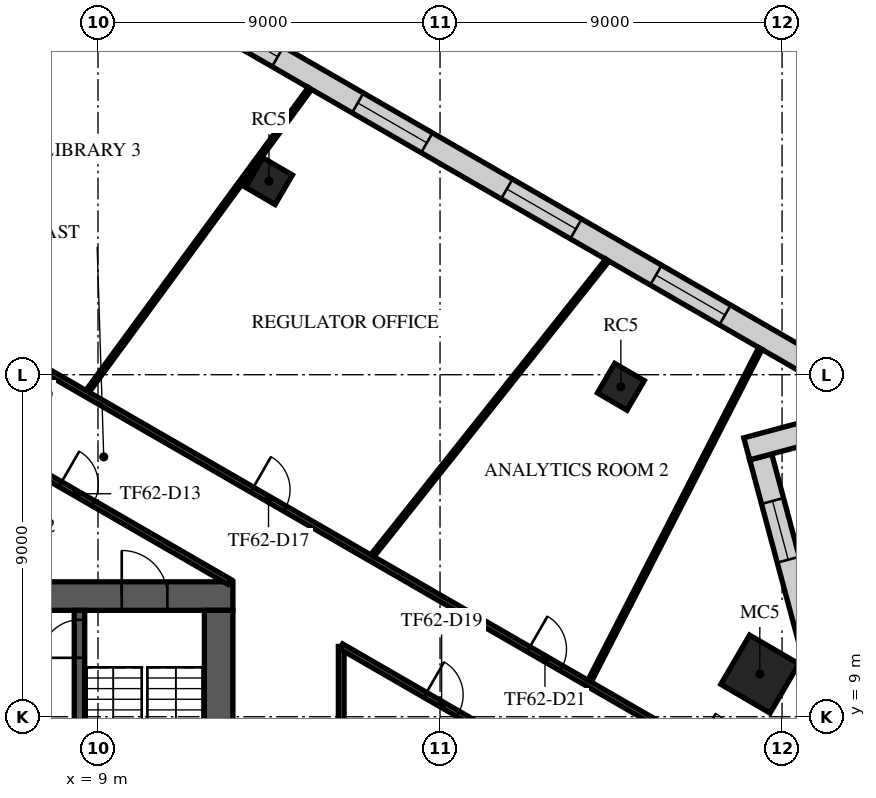
"""IFC4 building model, lengths in metres.
Left out: names, types, materials, properties, quantities, classifications, styles, units other than length and angle.
Written with IfcOpenShell. Run it as: python <this file> out.ifc"""

import sys

from ifc_helpers import new_model, si_unit, direction, frame, frame_2d, origin, origin_2d, place, context, subcontext, project, spatial, rectangle, extrude, element, fill, save


model = new_model("IFC4")
c1 = context("Model", 3, precision=1e-05, world=origin(), true_north=direction((0.0, 1.0)))
c2 = subcontext(c1, "Body", "Model", "MODEL_VIEW")
j1 = project(units=[si_unit("LENGTHUNIT", "METRE"), si_unit("PLANEANGLEUNIT", "RADIAN")], contexts=[c1])
p1 = place(None, origin())
s1 = spatial("IfcSite", under=j1, at=p1, CompositionType="ELEMENT")
p2 = place(p1, origin())
s2 = spatial("IfcBuilding", under=s1, at=p2, CompositionType="ELEMENT")
p3 = place(p2, frame((0.0, 0.0, 262.9)))
s3 = spatial("IfcBuildingStorey", under=s2, at=p3, CompositionType="ELEMENT", Elevation=262.9)
p4 = place(p3, frame((26.415, 10.122, 0.0), z_axis=(0.0, 0.0, 1.0), x_axis=(0.504643651291, 0.863327739165, 0.0)))
e1 = element("IfcColumn", 1, at=p4, inside=s3, PredefinedType="COLUMN", context=c2, shape_type="SweptSolid", body=[
    extrude(rectangle(XDim=1.5, YDim=1.5, at=origin_2d()), origin(), (0.0, 0.0, 1.0), 4.0),
])
for number, where, z_axis, x_axis in (
    (2, (22.758, 17.682, 0.0), (0.0, 0.0, 1.0), (0.505, 0.863, 0.0)),
    (3, (13.499, 23.094, 0.0), (0.0, 0.0, 1.0), (0.505, 0.863, 0.0)),
):
    element("IfcColumn", number, at=place(p3, frame(where, z_axis=z_axis, x_axis=x_axis)), inside=s3, PredefinedType="COLUMN", context=c2, shape_type="SweptSolid", body=[
        extrude(rectangle(XDim=0.9, YDim=0.9, at=origin_2d()), origin(), (0.0, 0.0, 1.0), 4.0),
    ])
p5 = place(p3, frame((-12.55, 12.175, 0.0), z_axis=(0.0, 0.0, 1.0), x_axis=(1.0, 0.0, 0.0)))
e4 = element("IfcWall", 4, at=p5, inside=s3, PredefinedType="SHEAR", context=c2, shape_type="SweptSolid", body=[
    extrude(rectangle(XDim=25.1, YDim=0.75, at=frame_2d((12.55, 0.0))), origin(), (0.0, 0.0, 1.0), 3.64),
])
p6 = place(p5, frame((11.35, 0.0, 0.0)))
e5 = element("IfcOpeningElement", 5, at=p6, cuts=e4, PredefinedType="OPENING", context=c2, shape_type="SweptSolid", body=[
    extrude(rectangle(XDim=2.4, YDim=2.4, at=frame_2d((1.2, 1.2))), frame((0.0, 0.385, 0.0), z_axis=(0.0, -1.0, 0.0), x_axis=(1.0, 0.0, 0.0)), (0.0, 0.0, 1.0), 0.77),
])
p7 = place(p5, frame((22.175, 0.0, 0.0)))
e6 = element("IfcOpeningElement", 6, at=p7, cuts=e4, PredefinedType="OPENING", context=c2, shape_type="SweptSolid", body=[
    extrude(rectangle(XDim=1.2, YDim=2.1, at=frame_2d((0.6, 1.05))), frame((0.0, 0.385, 0.0), z_axis=(0.0, -1.0, 0.0), x_axis=(1.0, 0.0, 0.0)), (0.0, 0.0, 1.0), 0.77),
])
p8 = place(p5, frame((1.15, 0.0, 0.0)))
e7 = element("IfcOpeningElement", 7, at=p8, cuts=e4, PredefinedType="OPENING", context=c2, shape_type="SweptSolid", body=[
    extrude(rectangle(XDim=1.0, YDim=2.1, at=frame_2d((0.5, 1.05))), frame((0.0, 0.385, 0.0), z_axis=(0.0, -1.0, 0.0), x_axis=(1.0, 0.0, 0.0)), (0.0, 0.0, 1.0), 0.77),
])
p9 = place(p3, frame((12.175, -11.8, 0.0), z_axis=(0.0, 0.0, 1.0), x_axis=(0.0, 1.0, 0.0)))
e8 = element("IfcWall", 8, at=p9, inside=s3, PredefinedType="SHEAR", context=c2, shape_type="SweptSolid", body=[
    extrude(rectangle(XDim=23.6, YDim=0.75, at=frame_2d((11.8, 0.0))), origin(), (0.0, 0.0, 1.0), 3.64),
])
p10 = place(p9, frame((10.6, 0.0, 0.0)))
e9 = element("IfcOpeningElement", 9, at=p10, cuts=e8, PredefinedType="OPENING", context=c2, shape_type="SweptSolid", body=[
    extrude(rectangle(XDim=2.4, YDim=2.4, at=frame_2d((1.2, 1.2))), frame((0.0, 0.385, 0.0), z_axis=(0.0, -1.0, 0.0), x_axis=(1.0, 0.0, 0.0)), (0.0, 0.0, 1.0), 0.77),
])
p11 = place(p3, frame((8.512, 4.55, 0.0), z_axis=(0.0, 0.0, 1.0), x_axis=(0.0, 1.0, 0.0)))
e10 = element("IfcWall", 10, at=p11, inside=s3, PredefinedType="SOLIDWALL", context=c2, shape_type="SweptSolid", body=[
    extrude(rectangle(XDim=7.25, YDim=0.275, at=frame_2d((3.625, 0.0))), origin(), (0.0, 0.0, 1.0), 3.64),
])
p12 = place(p11, frame((6.0, 0.0, 0.0)))
e11 = element("IfcOpeningElement", 11, at=p12, cuts=e10, PredefinedType="OPENING", context=c2, shape_type="SweptSolid", body=[
    extrude(rectangle(XDim=1.0, YDim=2.1, at=frame_2d((0.5, 1.05))), frame((0.0, 0.147, 0.0), z_axis=(0.0, -1.0, 0.0), x_axis=(1.0, 0.0, 0.0)), (0.0, 0.0, 1.0), 0.295),
])
p13 = place(p3, frame((8.094, -32.782, 0.0), z_axis=(0.0, 0.0, 1.0), x_axis=(0.499997945818, 0.866026589763, 0.0)))
e12 = element("IfcWall", 12, at=p13, inside=s3, PredefinedType="STANDARD", context=c2, shape_type="SweptSolid", body=[
    extrude(rectangle(XDim=48.686, YDim=0.6, at=frame_2d((24.343, 0.0))), origin(), (0.0, 0.0, 1.0), 3.64),
])
p14 = place(p13, frame((1.213, 0.0, 0.9)))
e13 = element("IfcOpeningElement", 13, at=p14, cuts=e12, PredefinedType="OPENING", context=c2, shape_type="SweptSolid", body=[
    extrude(rectangle(XDim=2.0, YDim=2.1, at=frame_2d((1.0, 1.05))), frame((0.0, 0.31, 0.0), z_axis=(0.0, -1.0, 0.0), x_axis=(1.0, 0.0, 0.0)), (0.0, 0.0, 1.0), 0.62),
])
p15 = place(p13, frame((5.639, 0.0, 0.9)))
e14 = element("IfcOpeningElement", 14, at=p15, cuts=e12, PredefinedType="OPENING", context=c2, shape_type="SweptSolid", body=[
    extrude(rectangle(XDim=2.0, YDim=2.1, at=frame_2d((1.0, 1.05))), frame((0.0, 0.31, 0.0), z_axis=(0.0, -1.0, 0.0), x_axis=(1.0, 0.0, 0.0)), (0.0, 0.0, 1.0), 0.62),
])
p16 = place(p13, frame((10.065, 0.0, 0.9)))
e15 = element("IfcOpeningElement", 15, at=p16, cuts=e12, PredefinedType="OPENING", context=c2, shape_type="SweptSolid", body=[
    extrude(rectangle(XDim=2.0, YDim=2.1, at=frame_2d((1.0, 1.05))), frame((0.0, 0.31, 0.0), z_axis=(0.0, -1.0, 0.0), x_axis=(1.0, 0.0, 0.0)), (0.0, 0.0, 1.0), 0.62),
])
p17 = place(p13, frame((14.491, 0.0, 0.9)))
e16 = element("IfcOpeningElement", 16, at=p17, cuts=e12, PredefinedType="OPENING", context=c2, shape_type="SweptSolid", body=[
    extrude(rectangle(XDim=2.0, YDim=2.1, at=frame_2d((1.0, 1.05))), frame((0.0, 0.31, 0.0), z_axis=(0.0, -1.0, 0.0), x_axis=(1.0, 0.0, 0.0)), (0.0, 0.0, 1.0), 0.62),
])
p18 = place(p13, frame((18.917, 0.0, 0.9)))
e17 = element("IfcOpeningElement", 17, at=p18, cuts=e12, PredefinedType="OPENING", context=c2, shape_type="SweptSolid", body=[
    extrude(rectangle(XDim=2.0, YDim=2.1, at=frame_2d((1.0, 1.05))), frame((0.0, 0.31, 0.0), z_axis=(0.0, -1.0, 0.0), x_axis=(1.0, 0.0, 0.0)), (0.0, 0.0, 1.0), 0.62),
])
p19 = place(p13, frame((23.343, 0.0, 0.9)))
e18 = element("IfcOpeningElement", 18, at=p19, cuts=e12, PredefinedType="OPENING", context=c2, shape_type="SweptSolid", body=[
    extrude(rectangle(XDim=2.0, YDim=2.1, at=frame_2d((1.0, 1.05))), frame((0.0, 0.31, 0.0), z_axis=(0.0, -1.0, 0.0), x_axis=(1.0, 0.0, 0.0)), (0.0, 0.0, 1.0), 0.62),
])
p20 = place(p13, frame((27.769, 0.0, 0.9)))
e19 = element("IfcOpeningElement", 19, at=p20, cuts=e12, PredefinedType="OPENING", context=c2, shape_type="SweptSolid", body=[
    extrude(rectangle(XDim=2.0, YDim=2.1, at=frame_2d((1.0, 1.05))), frame((0.0, 0.31, 0.0), z_axis=(0.0, -1.0, 0.0), x_axis=(1.0, 0.0, 0.0)), (0.0, 0.0, 1.0), 0.62),
])
p21 = place(p13, frame((32.195, 0.0, 0.9)))
e20 = element("IfcOpeningElement", 20, at=p21, cuts=e12, PredefinedType="OPENING", context=c2, shape_type="SweptSolid", body=[
    extrude(rectangle(XDim=2.0, YDim=2.1, at=frame_2d((1.0, 1.05))), frame((0.0, 0.31, 0.0), z_axis=(0.0, -1.0, 0.0), x_axis=(1.0, 0.0, 0.0)), (0.0, 0.0, 1.0), 0.62),
])
p22 = place(p13, frame((36.621, 0.0, 0.9)))
e21 = element("IfcOpeningElement", 21, at=p22, cuts=e12, PredefinedType="OPENING", context=c2, shape_type="SweptSolid", body=[
    extrude(rectangle(XDim=2.0, YDim=2.1, at=frame_2d((1.0, 1.05))), frame((0.0, 0.31, 0.0), z_axis=(0.0, -1.0, 0.0), x_axis=(1.0, 0.0, 0.0)), (0.0, 0.0, 1.0), 0.62),
])
p23 = place(p13, frame((41.047, 0.0, 0.9)))
e22 = element("IfcOpeningElement", 22, at=p23, cuts=e12, PredefinedType="OPENING", context=c2, shape_type="SweptSolid", body=[
    extrude(rectangle(XDim=2.0, YDim=2.1, at=frame_2d((1.0, 1.05))), frame((0.0, 0.31, 0.0), z_axis=(0.0, -1.0, 0.0), x_axis=(1.0, 0.0, 0.0)), (0.0, 0.0, 1.0), 0.62),
])
p24 = place(p13, frame((45.473, 0.0, 0.9)))
e23 = element("IfcOpeningElement", 23, at=p24, cuts=e12, PredefinedType="OPENING", context=c2, shape_type="SweptSolid", body=[
    extrude(rectangle(XDim=2.0, YDim=2.1, at=frame_2d((1.0, 1.05))), frame((0.0, 0.31, 0.0), z_axis=(0.0, -1.0, 0.0), x_axis=(1.0, 0.0, 0.0)), (0.0, 0.0, 1.0), 0.62),
])
p25 = place(p3, frame((28.509, 8.11, 0.0), z_axis=(0.0, 0.0, 1.0), x_axis=(-0.258815405168, 0.965926801599, 0.0)))
e24 = element("IfcWall", 24, at=p25, inside=s3, PredefinedType="STANDARD", context=c2, shape_type="SweptSolid", body=[
    extrude(rectangle(XDim=8.0, YDim=0.6, at=frame_2d((4.0, 0.0))), origin(), (0.0, 0.0, 1.0), 3.64),
])
p26 = place(p25, frame((5.2, 0.0, 0.9)))
e25 = element("IfcOpeningElement", 25, at=p26, cuts=e24, PredefinedType="OPENING", context=c2, shape_type="SweptSolid", body=[
    extrude(rectangle(XDim=1.6, YDim=2.1, at=frame_2d((0.8, 1.05))), frame((0.0, 0.31, 0.0), z_axis=(0.0, -1.0, 0.0), x_axis=(1.0, 0.0, 0.0)), (0.0, 0.0, 1.0), 0.62),
])
p27 = place(p3, frame((26.071, 16.049, 0.0), z_axis=(0.0, 0.0, 1.0), x_axis=(0.965928304125, 0.258809797517, 0.0)))
e26 = element("IfcWall", 26, at=p27, inside=s3, PredefinedType="STANDARD", context=c2, shape_type="SweptSolid", body=[
    extrude(rectangle(XDim=4.635, YDim=0.6, at=frame_2d((2.318, 0.0))), origin(), (0.0, 0.0, 1.0), 3.64),
])
p28 = place(p27, frame((1.818, 0.0, 0.9)))
e27 = element("IfcOpeningElement", 27, at=p28, cuts=e26, PredefinedType="OPENING", context=c2, shape_type="SweptSolid", body=[
    extrude(rectangle(XDim=1.6, YDim=2.1, at=frame_2d((0.8, 1.05))), frame((0.0, 0.31, 0.0), z_axis=(0.0, -1.0, 0.0), x_axis=(1.0, 0.0, 0.0)), (0.0, 0.0, 1.0), 0.62),
])
p29 = place(p3, frame((30.476, 16.699, 0.0), z_axis=(0.0, 0.0, 1.0), x_axis=(-0.866025061514, 0.500000592829, 0.0)))
e28 = element("IfcWall", 28, at=p29, inside=s3, PredefinedType="STANDARD", context=c2, shape_type="SweptSolid", body=[
    extrude(rectangle(XDim=36.243, YDim=0.6, at=frame_2d((18.122, 0.0))), origin(), (0.0, 0.0, 1.0), 3.64),
])
p30 = place(p29, frame((1.215, 0.0, 0.9)))
e29 = element("IfcOpeningElement", 29, at=p30, cuts=e28, PredefinedType="OPENING", context=c2, shape_type="SweptSolid", body=[
    extrude(rectangle(XDim=2.1, YDim=2.1, at=frame_2d((1.05, 1.05))), frame((0.0, 0.31, 0.0), z_axis=(0.0, -1.0, 0.0), x_axis=(1.0, 0.0, 0.0)), (0.0, 0.0, 1.0), 0.62),
])
p31 = place(p29, frame((5.746, 0.0, 0.9)))
e30 = element("IfcOpeningElement", 30, at=p31, cuts=e28, PredefinedType="OPENING", context=c2, shape_type="SweptSolid", body=[
    extrude(rectangle(XDim=2.1, YDim=2.1, at=frame_2d((1.05, 1.05))), frame((0.0, 0.31, 0.0), z_axis=(0.0, -1.0, 0.0), x_axis=(1.0, 0.0, 0.0)), (0.0, 0.0, 1.0), 0.62),
])
p32 = place(p29, frame((10.276, 0.0, 0.9)))
e31 = element("IfcOpeningElement", 31, at=p32, cuts=e28, PredefinedType="OPENING", context=c2, shape_type="SweptSolid", body=[
    extrude(rectangle(XDim=2.1, YDim=2.1, at=frame_2d((1.05, 1.05))), frame((0.0, 0.31, 0.0), z_axis=(0.0, -1.0, 0.0), x_axis=(1.0, 0.0, 0.0)), (0.0, 0.0, 1.0), 0.62),
])
p33 = place(p29, frame((14.806, 0.0, 0.9)))
e32 = element("IfcOpeningElement", 32, at=p33, cuts=e28, PredefinedType="OPENING", context=c2, shape_type="SweptSolid", body=[
    extrude(rectangle(XDim=2.1, YDim=2.1, at=frame_2d((1.05, 1.05))), frame((0.0, 0.31, 0.0), z_axis=(0.0, -1.0, 0.0), x_axis=(1.0, 0.0, 0.0)), (0.0, 0.0, 1.0), 0.62),
])
p34 = place(p29, frame((19.337, 0.0, 0.9)))
e33 = element("IfcOpeningElement", 33, at=p34, cuts=e28, PredefinedType="OPENING", context=c2, shape_type="SweptSolid", body=[
    extrude(rectangle(XDim=2.1, YDim=2.1, at=frame_2d((1.05, 1.05))), frame((0.0, 0.31, 0.0), z_axis=(0.0, -1.0, 0.0), x_axis=(1.0, 0.0, 0.0)), (0.0, 0.0, 1.0), 0.62),
])
p35 = place(p29, frame((23.867, 0.0, 0.9)))
e34 = element("IfcOpeningElement", 34, at=p35, cuts=e28, PredefinedType="OPENING", context=c2, shape_type="SweptSolid", body=[
    extrude(rectangle(XDim=2.1, YDim=2.1, at=frame_2d((1.05, 1.05))), frame((0.0, 0.31, 0.0), z_axis=(0.0, -1.0, 0.0), x_axis=(1.0, 0.0, 0.0)), (0.0, 0.0, 1.0), 0.62),
])
p36 = place(p29, frame((28.398, 0.0, 0.9)))
e35 = element("IfcOpeningElement", 35, at=p36, cuts=e28, PredefinedType="OPENING", context=c2, shape_type="SweptSolid", body=[
    extrude(rectangle(XDim=2.1, YDim=2.1, at=frame_2d((1.05, 1.05))), frame((0.0, 0.31, 0.0), z_axis=(0.0, -1.0, 0.0), x_axis=(1.0, 0.0, 0.0)), (0.0, 0.0, 1.0), 0.62),
])
p37 = place(p29, frame((32.928, 0.0, 0.9)))
e36 = element("IfcOpeningElement", 36, at=p37, cuts=e28, PredefinedType="OPENING", context=c2, shape_type="SweptSolid", body=[
    extrude(rectangle(XDim=2.1, YDim=2.1, at=frame_2d((1.05, 1.05))), frame((0.0, 0.31, 0.0), z_axis=(0.0, -1.0, 0.0), x_axis=(1.0, 0.0, 0.0)), (0.0, 0.0, 1.0), 0.62),
])
p38 = place(p3, frame((-7.247, 26.698, 0.0), z_axis=(0.0, 0.0, 1.0), x_axis=(0.866022442497, -0.500005129065, 0.0)))
e37 = element("IfcWall", 37, at=p38, inside=s3, PredefinedType="PARTITIONING", context=c2, shape_type="SweptSolid", body=[
    extrude(rectangle(XDim=39.325, YDim=0.15, at=frame_2d((19.662, 0.0))), origin(), (0.0, 0.0, 1.0), 3.04),
])
p39 = place(p38, frame((15.654, 0.0, 0.0)))
e38 = element("IfcOpeningElement", 38, at=p39, cuts=e37, PredefinedType="OPENING", context=c2, shape_type="SweptSolid", body=[
    extrude(rectangle(XDim=1.0, YDim=2.1, at=frame_2d((0.5, 1.05))), frame((0.0, 0.085, 0.0), z_axis=(0.0, -1.0, 0.0), x_axis=(1.0, 0.0, 0.0)), (0.0, 0.0, 1.0), 0.17),
])
p40 = place(p38, frame((23.442, 0.0, 0.0)))
e39 = element("IfcOpeningElement", 39, at=p40, cuts=e37, PredefinedType="OPENING", context=c2, shape_type="SweptSolid", body=[
    extrude(rectangle(XDim=1.0, YDim=2.1, at=frame_2d((0.5, 1.05))), frame((0.0, 0.085, 0.0), z_axis=(0.0, -1.0, 0.0), x_axis=(1.0, 0.0, 0.0)), (0.0, 0.0, 1.0), 0.17),
])
p41 = place(p38, frame((31.841, 0.0, 0.0)))
e40 = element("IfcOpeningElement", 40, at=p41, cuts=e37, PredefinedType="OPENING", context=c2, shape_type="SweptSolid", body=[
    extrude(rectangle(XDim=1.0, YDim=2.1, at=frame_2d((0.5, 1.05))), frame((0.0, 0.085, 0.0), z_axis=(0.0, -1.0, 0.0), x_axis=(1.0, 0.0, 0.0)), (0.0, 0.0, 1.0), 0.17),
])
p42 = place(p38, frame((36.955, 0.0, 0.0)))
e41 = element("IfcOpeningElement", 41, at=p42, cuts=e37, PredefinedType="OPENING", context=c2, shape_type="SweptSolid", body=[
    extrude(rectangle(XDim=1.0, YDim=2.1, at=frame_2d((0.5, 1.05))), frame((0.0, 0.085, 0.0), z_axis=(0.0, -1.0, 0.0), x_axis=(1.0, 0.0, 0.0)), (0.0, 0.0, 1.0), 0.17),
])
p43 = place(p3, frame((5.15, 16.769, 0.0), z_axis=(0.0, 0.0, 1.0), x_axis=(0.866010168016, -0.500026388196, 0.0)))
e42 = element("IfcWall", 42, at=p43, inside=s3, PredefinedType="PARTITIONING", context=c2, shape_type="SweptSolid", body=[
    extrude(rectangle(XDim=8.437, YDim=0.15, at=frame_2d((4.218, 0.0))), origin(), (0.0, 0.0, 1.0), 3.24),
])
p44 = place(p43, frame((3.3, 0.0, 0.0)))
e43 = element("IfcOpeningElement", 43, at=p44, cuts=e42, PredefinedType="OPENING", context=c2, shape_type="SweptSolid", body=[
    extrude(rectangle(XDim=1.0, YDim=2.1, at=frame_2d((0.5, 1.05))), frame((0.0, 0.085, 0.0), z_axis=(0.0, -1.0, 0.0), x_axis=(1.0, 0.0, 0.0)), (0.0, 0.0, 1.0), 0.17),
])
p45 = place(p3, frame((15.4, -15.325, 0.0), z_axis=(0.0, 0.0, 1.0), x_axis=(0.0, 1.0, 0.0)))
e44 = element("IfcWall", 44, at=p45, inside=s3, PredefinedType="PARTITIONING", context=c2, shape_type="SweptSolid", body=[
    extrude(rectangle(XDim=26.175, YDim=0.15, at=frame_2d((13.087, 0.0))), origin(), (0.0, 0.0, 1.0), 3.24),
])
p46 = place(p45, frame((15.312, 0.0, 0.0)))
e45 = element("IfcOpeningElement", 45, at=p46, cuts=e44, PredefinedType="OPENING", context=c2, shape_type="SweptSolid", body=[
    extrude(rectangle(XDim=1.0, YDim=2.1, at=frame_2d((0.5, 1.05))), frame((0.0, 0.085, 0.0), z_axis=(0.0, -1.0, 0.0), x_axis=(1.0, 0.0, 0.0)), (0.0, 0.0, 1.0), 0.17),
])
p47 = place(p45, frame((4.619, 0.0, 0.0)))
e46 = element("IfcOpeningElement", 46, at=p47, cuts=e44, PredefinedType="OPENING", context=c2, shape_type="SweptSolid", body=[
    extrude(rectangle(XDim=1.0, YDim=2.1, at=frame_2d((0.5, 1.05))), frame((0.0, 0.085, 0.0), z_axis=(0.0, -1.0, 0.0), x_axis=(1.0, 0.0, 0.0)), (0.0, 0.0, 1.0), 0.17),
])
p48 = place(p3, frame((15.4, 10.851, 0.0), z_axis=(0.0, 0.0, 1.0), x_axis=(0.865993826089, -0.500054690184, 0.0)))
e47 = element("IfcWall", 47, at=p48, inside=s3, PredefinedType="PARTITIONING", context=c2, shape_type="SweptSolid", body=[
    extrude(rectangle(XDim=11.789, YDim=0.15, at=frame_2d((5.895, 0.0))), origin(), (0.0, 0.0, 1.0), 3.04),
])
p49 = place(p48, frame((2.55, 0.0, 0.0)))
e48 = element("IfcOpeningElement", 48, at=p49, cuts=e47, PredefinedType="OPENING", context=c2, shape_type="SweptSolid", body=[
    extrude(rectangle(XDim=1.0, YDim=2.1, at=frame_2d((0.5, 1.05))), frame((0.0, 0.085, 0.0), z_axis=(0.0, -1.0, 0.0), x_axis=(1.0, 0.0, 0.0)), (0.0, 0.0, 1.0), 0.17),
])
p50 = place(p3, frame((8.728, 17.567, 0.0), z_axis=(0.0, 0.0, 1.0), x_axis=(0.591764258376, 0.806111073307, 0.0)))
e49 = element("IfcWall", 49, at=p50, inside=s3, PredefinedType="PARTITIONING", context=c2, shape_type="SweptSolid", body=[
    extrude(rectangle(XDim=9.88, YDim=0.1, at=frame_2d((4.94, 0.0))), origin(), (0.0, 0.0, 1.0), 3.04),
])
p51 = place(p3, frame((16.223, 13.242, 0.0), z_axis=(0.0, 0.0, 1.0), x_axis=(0.622346910835, 0.78274154264, 0.0)))
e50 = element("IfcWall", 50, at=p51, inside=s3, PredefinedType="PARTITIONING", context=c2, shape_type="SweptSolid", body=[
    extrude(rectangle(XDim=9.927, YDim=0.1, at=frame_2d((4.964, 0.0))), origin(), (0.0, 0.0, 1.0), 3.04),
])
p52 = place(p3, frame((21.936, 9.938, 0.0), z_axis=(0.0, 0.0, 1.0), x_axis=(0.456562052213, 0.889691571545, 0.0)))
e51 = element("IfcWall", 51, at=p52, inside=s3, PredefinedType="PARTITIONING", context=c2, shape_type="SweptSolid", body=[
    extrude(rectangle(XDim=9.835, YDim=0.1, at=frame_2d((4.918, 0.0))), origin(), (0.0, 0.0, 1.0), 3.04),
])
p53 = place(p7, origin())
e52 = element("IfcDoor", 52, at=p53, inside=s3, OperationType="SINGLE_SWING_LEFT", PredefinedType="DOOR", context=c2, shape_type="SweptSolid", body=[
    extrude(rectangle(XDim=1.2, YDim=2.1, at=frame_2d((0.6, 1.05))), frame((0.0, 0.025, 0.0), z_axis=(0.0, -1.0, 0.0), x_axis=(1.0, 0.0, 0.0)), (0.0, 0.0, 1.0), 0.05),
])
fill(e6, e52)
p54 = place(p12, origin())
e53 = element("IfcDoor", 53, at=p54, inside=s3, OperationType="SINGLE_SWING_LEFT", PredefinedType="DOOR", context=c2, shape_type="SweptSolid", body=[
    extrude(rectangle(XDim=1.0, YDim=2.1, at=frame_2d((0.5, 1.05))), frame((0.0, 0.025, 0.0), z_axis=(0.0, -1.0, 0.0), x_axis=(1.0, 0.0, 0.0)), (0.0, 0.0, 1.0), 0.05),
])
fill(e11, e53)
p55 = place(p26, origin())
e54 = element("IfcWindow", 54, at=p55, inside=s3, PartitioningType="SINGLE_PANEL", PredefinedType="WINDOW", context=c2, shape_type="SweptSolid", body=[
    extrude(rectangle(XDim=1.6, YDim=2.1, at=frame_2d((0.8, 1.05))), frame((0.0, 0.03, 0.0), z_axis=(0.0, -1.0, 0.0), x_axis=(1.0, 0.0, 0.0)), (0.0, 0.0, 1.0), 0.06),
])
fill(e25, e54)
p56 = place(p31, origin())
e55 = element("IfcWindow", 55, at=p56, inside=s3, PartitioningType="SINGLE_PANEL", PredefinedType="WINDOW", context=c2, shape_type="SweptSolid", body=[
    extrude(rectangle(XDim=2.1, YDim=2.1, at=frame_2d((1.05, 1.05))), frame((0.0, 0.03, 0.0), z_axis=(0.0, -1.0, 0.0), x_axis=(1.0, 0.0, 0.0)), (0.0, 0.0, 1.0), 0.06),
])
fill(e30, e55)
p57 = place(p32, origin())
e56 = element("IfcWindow", 56, at=p57, inside=s3, PartitioningType="SINGLE_PANEL", PredefinedType="WINDOW", context=c2, shape_type="SweptSolid", body=[
    extrude(rectangle(XDim=2.1, YDim=2.1, at=frame_2d((1.05, 1.05))), frame((0.0, 0.03, 0.0), z_axis=(0.0, -1.0, 0.0), x_axis=(1.0, 0.0, 0.0)), (0.0, 0.0, 1.0), 0.06),
])
fill(e31, e56)
p58 = place(p33, origin())
e57 = element("IfcWindow", 57, at=p58, inside=s3, PartitioningType="SINGLE_PANEL", PredefinedType="WINDOW", context=c2, shape_type="SweptSolid", body=[
    extrude(rectangle(XDim=2.1, YDim=2.1, at=frame_2d((1.05, 1.05))), frame((0.0, 0.03, 0.0), z_axis=(0.0, -1.0, 0.0), x_axis=(1.0, 0.0, 0.0)), (0.0, 0.0, 1.0), 0.06),
])
fill(e32, e57)
p59 = place(p34, origin())
e58 = element("IfcWindow", 58, at=p59, inside=s3, PartitioningType="SINGLE_PANEL", PredefinedType="WINDOW", context=c2, shape_type="SweptSolid", body=[
    extrude(rectangle(XDim=2.1, YDim=2.1, at=frame_2d((1.05, 1.05))), frame((0.0, 0.03, 0.0), z_axis=(0.0, -1.0, 0.0), x_axis=(1.0, 0.0, 0.0)), (0.0, 0.0, 1.0), 0.06),
])
fill(e33, e58)
p60 = place(p44, frame((1.0, 0.0, 0.0), z_axis=(0.0, 0.0, 1.0), x_axis=(-1.0, 0.0, 0.0)))
e59 = element("IfcDoor", 59, at=p60, inside=s3, OperationType="SINGLE_SWING_RIGHT", PredefinedType="DOOR", context=c2, shape_type="SweptSolid", body=[
    extrude(rectangle(XDim=1.0, YDim=2.1, at=frame_2d((0.5, 1.05))), frame((0.0, 0.025, 0.0), z_axis=(0.0, -1.0, 0.0), x_axis=(1.0, 0.0, 0.0)), (0.0, 0.0, 1.0), 0.05),
])
fill(e43, e59)
p61 = place(p40, origin())
e60 = element("IfcDoor", 60, at=p61, inside=s3, OperationType="SINGLE_SWING_RIGHT", PredefinedType="DOOR", context=c2, shape_type="SweptSolid", body=[
    extrude(rectangle(XDim=1.0, YDim=2.1, at=frame_2d((0.5, 1.05))), frame((0.0, 0.025, 0.0), z_axis=(0.0, -1.0, 0.0), x_axis=(1.0, 0.0, 0.0)), (0.0, 0.0, 1.0), 0.05),
])
fill(e39, e60)
p62 = place(p49, frame((1.0, 0.0, 0.0), z_axis=(0.0, 0.0, 1.0), x_axis=(-1.0, 0.0, 0.0)))
e61 = element("IfcDoor", 61, at=p62, inside=s3, OperationType="SINGLE_SWING_LEFT", PredefinedType="DOOR", context=c2, shape_type="SweptSolid", body=[
    extrude(rectangle(XDim=1.0, YDim=2.1, at=frame_2d((0.5, 1.05))), frame((0.0, 0.025, 0.0), z_axis=(0.0, -1.0, 0.0), x_axis=(1.0, 0.0, 0.0)), (0.0, 0.0, 1.0), 0.05),
])
fill(e48, e61)
p63 = place(p41, origin())
e62 = element("IfcDoor", 62, at=p63, inside=s3, OperationType="SINGLE_SWING_RIGHT", PredefinedType="DOOR", context=c2, shape_type="SweptSolid", body=[
    extrude(rectangle(XDim=1.0, YDim=2.1, at=frame_2d((0.5, 1.05))), frame((0.0, 0.025, 0.0), z_axis=(0.0, -1.0, 0.0), x_axis=(1.0, 0.0, 0.0)), (0.0, 0.0, 1.0), 0.05),
])
fill(e40, e62)
save(model, sys.argv[1])
